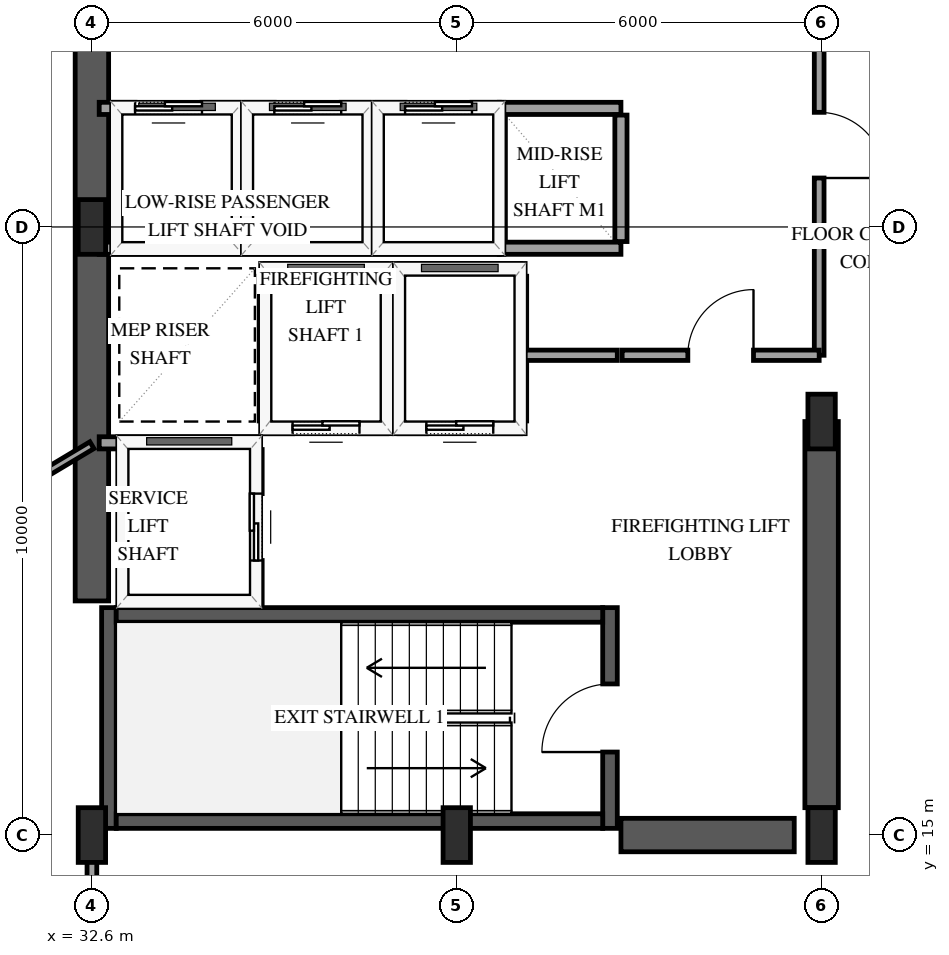
"""IFC4 building model, lengths in metres.
Left out: names, types, materials, properties, quantities, classifications, styles, units other than length and angle.
Written with IfcOpenShell. Run it as: python <this file> out.ifc"""

import sys

from ifc_helpers import new_model, si_unit, direction, frame, frame_2d, origin, origin_2d, place, context, subcontext, project, spatial, rectangle, extrude, element, fill, save


model = new_model("IFC4")
c1 = context("Model", 3, precision=1e-05, world=origin(), true_north=direction((0.0, 1.0)))
c2 = subcontext(c1, "Body", "Model", "MODEL_VIEW")
j1 = project(units=[si_unit("LENGTHUNIT", "METRE"), si_unit("PLANEANGLEUNIT", "RADIAN")], contexts=[c1])
p1 = place(None, origin())
s1 = spatial("IfcSite", under=j1, at=p1, CompositionType="ELEMENT")
p2 = place(p1, origin())
s2 = spatial("IfcBuilding", under=s1, at=p2, CompositionType="ELEMENT")
p3 = place(p2, frame((0.0, 0.0, 114.7)))
s3 = spatial("IfcBuildingStorey", under=s2, at=p3, CompositionType="ELEMENT", Elevation=114.7)
p4 = place(p3, frame((32.88, 15.11, 0.0), z_axis=(0.0, 0.0, 1.0), x_axis=(0.0, 1.0, 0.0)))
e1 = element("IfcWall", 1, at=p4, inside=s3, PredefinedType="SHEAR", context=c2, shape_type="SweptSolid", body=[
    extrude(rectangle(XDim=3.63, YDim=0.24, at=frame_2d((1.815, 0.0))), origin(), (0.0, 0.0, 1.0), 3.9),
])
p5 = place(p3, frame((41.12, 15.11, 0.0), z_axis=(0.0, 0.0, 1.0), x_axis=(0.0, 1.0, 0.0)))
e2 = element("IfcWall", 2, at=p5, inside=s3, PredefinedType="SHEAR", context=c2, shape_type="SweptSolid", body=[
    extrude(rectangle(XDim=3.63, YDim=0.24, at=frame_2d((1.815, 0.0))), origin(), (0.0, 0.0, 1.0), 3.9),
])
p6 = place(p5, frame((1.255, 0.0, 0.0)))
e3 = element("IfcOpeningElement", 3, at=p6, cuts=e2, PredefinedType="OPENING", context=c2, shape_type="SweptSolid", body=[
    extrude(rectangle(XDim=1.12, YDim=2.15, at=frame_2d((0.56, 1.075))), frame((0.0, 0.13, 0.0), z_axis=(0.0, -1.0, 0.0), x_axis=(1.0, 0.0, 0.0)), (0.0, 0.0, 1.0), 0.26),
])
for number, where, z_axis, x_axis in (
    (4, (33.0, 15.23, 0.0), (0.0, 0.0, 1.0), (1.0, 0.0, 0.0)),
    (5, (33.0, 18.62, 0.0), (0.0, 0.0, 1.0), (1.0, 0.0, 0.0)),
):
    element("IfcWall", number, at=place(p3, frame(where, z_axis=z_axis, x_axis=x_axis)), inside=s3, PredefinedType="SHEAR", context=c2, shape_type="SweptSolid", body=[
        extrude(rectangle(XDim=8.0, YDim=0.24, at=frame_2d((4.0, 0.0))), origin(), (0.0, 0.0, 1.0), 3.9),
    ])
p7 = place(p3, frame((32.6, 18.85, 0.0), z_axis=(0.0, 0.0, 1.0), x_axis=(0.0, 1.0, 0.0)))
e6 = element("IfcWall", 6, at=p7, inside=s3, PredefinedType="SHEAR", context=c2, shape_type="SweptSolid", body=[
    extrude(rectangle(XDim=12.3, YDim=0.55, at=frame_2d((6.15, 0.0))), origin(), (0.0, 0.0, 1.0), 3.9),
])
p8 = place(p3, frame((41.3, 15.0, 0.0), z_axis=(0.0, 0.0, 1.0), x_axis=(1.0, 0.0, 0.0)))
e7 = element("IfcWall", 7, at=p8, inside=s3, PredefinedType="SHEAR", context=c2, shape_type="SweptSolid", body=[
    extrude(rectangle(XDim=2.85, YDim=0.55, at=frame_2d((1.425, 0.0))), origin(), (0.0, 0.0, 1.0), 3.9),
])
p9 = place(p3, frame((44.6, 15.45, 0.0), z_axis=(0.0, 0.0, 1.0), x_axis=(0.0, 1.0, 0.0)))
e8 = element("IfcWall", 8, at=p9, inside=s3, PredefinedType="SHEAR", context=c2, shape_type="SweptSolid", body=[
    extrude(rectangle(XDim=6.35, YDim=0.55, at=frame_2d((3.175, 0.0))), origin(), (0.0, 0.0, 1.0), 3.9),
])
for number, where, z_axis, x_axis in (
    (9, (32.6, 15.0, 0.0), (0.0, 0.0, 1.0), (1.0, 0.0, 0.0)),
    (10, (32.6, 25.0, 0.0), (0.0, 0.0, 1.0), (1.0, 0.0, 0.0)),
    (11, (38.6, 15.0, 0.0), (0.0, 0.0, 1.0), (1.0, 0.0, 0.0)),
    (12, (44.6, 15.0, 0.0), (0.0, 0.0, 1.0), (1.0, 0.0, 0.0)),
    (13, (44.6, 21.8, 0.0), (0.0, 0.0, 1.0), (1.0, 0.0, 0.0)),
):
    element("IfcColumn", number, at=place(p3, frame(where, z_axis=z_axis, x_axis=x_axis)), inside=s3, PredefinedType="PILASTER", context=c2, shape_type="SweptSolid", body=[
        extrude(rectangle(XDim=0.45, YDim=0.9, at=origin_2d()), origin(), (0.0, 0.0, 1.0), 3.9),
    ])
p10 = place(p3, frame((35.45, 21.7, 0.0), z_axis=(0.0, 0.0, 1.0), x_axis=(1.0, 0.0, 0.0)))
e14 = element("IfcWall", 14, at=p10, inside=s3, PredefinedType="SOLIDWALL", context=c2, shape_type="SweptSolid", body=[
    extrude(rectangle(XDim=2.0, YDim=0.2, at=frame_2d((1.0, 0.0))), origin(), (0.0, 0.0, 1.0), 3.6),
])
p11 = place(p10, frame((0.45, 0.0, 0.0)))
e15 = element("IfcOpeningElement", 15, at=p11, cuts=e14, PredefinedType="OPENING", context=c2, shape_type="SweptSolid", body=[
    extrude(rectangle(XDim=1.1, YDim=2.15, at=frame_2d((0.55, 1.075))), frame((0.0, 0.11, 0.0), z_axis=(0.0, -1.0, 0.0), x_axis=(1.0, 0.0, 0.0)), (0.0, 0.0, 1.0), 0.22),
])
p12 = place(p3, frame((35.45, 24.3, 0.0), z_axis=(0.0, 0.0, 1.0), x_axis=(1.0, 0.0, 0.0)))
e16 = element("IfcWall", 16, at=p12, inside=s3, PredefinedType="SOLIDWALL", context=c2, shape_type="SweptSolid", body=[
    extrude(rectangle(XDim=2.0, YDim=0.2, at=frame_2d((1.0, 0.0))), origin(), (0.0, 0.0, 1.0), 3.6),
])
for number, where, z_axis, x_axis in (
    (17, (35.45, 21.81, 0.0), (0.0, 0.0, 1.0), (0.0, 1.0, 0.0)),
    (18, (37.45, 21.81, 0.0), (0.0, 0.0, 1.0), (0.0, 1.0, 0.0)),
):
    element("IfcWall", number, at=place(p3, frame(where, z_axis=z_axis, x_axis=x_axis)), inside=s3, PredefinedType="SOLIDWALL", context=c2, shape_type="SweptSolid", body=[
        extrude(rectangle(XDim=2.38, YDim=0.2, at=frame_2d((1.19, 0.0))), origin(), (0.0, 0.0, 1.0), 3.6),
    ])
p13 = place(p3, frame((37.65, 21.7, 0.0), z_axis=(0.0, 0.0, 1.0), x_axis=(1.0, 0.0, 0.0)))
e19 = element("IfcWall", 19, at=p13, inside=s3, PredefinedType="SOLIDWALL", context=c2, shape_type="SweptSolid", body=[
    extrude(rectangle(XDim=2.0, YDim=0.2, at=frame_2d((1.0, 0.0))), origin(), (0.0, 0.0, 1.0), 3.6),
])
p14 = place(p13, frame((0.45, 0.0, 0.0)))
e20 = element("IfcOpeningElement", 20, at=p14, cuts=e19, PredefinedType="OPENING", context=c2, shape_type="SweptSolid", body=[
    extrude(rectangle(XDim=1.1, YDim=2.15, at=frame_2d((0.55, 1.075))), frame((0.0, 0.11, 0.0), z_axis=(0.0, -1.0, 0.0), x_axis=(1.0, 0.0, 0.0)), (0.0, 0.0, 1.0), 0.22),
])
p15 = place(p3, frame((37.65, 24.3, 0.0), z_axis=(0.0, 0.0, 1.0), x_axis=(1.0, 0.0, 0.0)))
e21 = element("IfcWall", 21, at=p15, inside=s3, PredefinedType="SOLIDWALL", context=c2, shape_type="SweptSolid", body=[
    extrude(rectangle(XDim=2.0, YDim=0.2, at=frame_2d((1.0, 0.0))), origin(), (0.0, 0.0, 1.0), 3.6),
])
p16 = place(p3, frame((39.65, 21.81, 0.0), z_axis=(0.0, 0.0, 1.0), x_axis=(0.0, 1.0, 0.0)))
e22 = element("IfcWall", 22, at=p16, inside=s3, PredefinedType="SOLIDWALL", context=c2, shape_type="SweptSolid", body=[
    extrude(rectangle(XDim=2.38, YDim=0.2, at=frame_2d((1.19, 0.0))), origin(), (0.0, 0.0, 1.0), 3.6),
])
p17 = place(p3, frame((32.72, 21.45, 0.0), z_axis=(0.0, 0.0, 1.0), x_axis=(1.0, 0.0, 0.0)))
e23 = element("IfcWall", 23, at=p17, inside=s3, PredefinedType="SOLIDWALL", context=c2, shape_type="SweptSolid", body=[
    extrude(rectangle(XDim=2.58, YDim=0.2, at=frame_2d((1.29, 0.0))), origin(), (0.0, 0.0, 1.0), 3.6),
])
p18 = place(p3, frame((35.3, 18.79, 0.0), z_axis=(0.0, 0.0, 1.0), x_axis=(0.0, 1.0, 0.0)))
e24 = element("IfcWall", 24, at=p18, inside=s3, PredefinedType="SOLIDWALL", context=c2, shape_type="SweptSolid", body=[
    extrude(rectangle(XDim=2.55, YDim=0.2, at=frame_2d((1.275, 0.0))), origin(), (0.0, 0.0, 1.0), 3.6),
])
p19 = place(p18, frame((0.725, 0.0, 0.0)))
e25 = element("IfcOpeningElement", 25, at=p19, cuts=e24, PredefinedType="OPENING", context=c2, shape_type="SweptSolid", body=[
    extrude(rectangle(XDim=1.1, YDim=2.15, at=frame_2d((0.55, 1.075))), frame((0.0, 0.11, 0.0), z_axis=(0.0, -1.0, 0.0), x_axis=(1.0, 0.0, 0.0)), (0.0, 0.0, 1.0), 0.22),
])
p20 = place(p3, frame((32.72, 24.65, 0.0), z_axis=(0.0, 0.0, 1.0), x_axis=(1.0, 0.0, 0.0)))
e26 = element("IfcWall", 26, at=p20, inside=s3, PredefinedType="SOLIDWALL", context=c2, shape_type="SweptSolid", body=[
    extrude(rectangle(XDim=2.28, YDim=0.2, at=frame_2d((1.14, 0.0))), origin(), (0.0, 0.0, 1.0), 3.6),
])
p21 = place(p3, frame((32.72, 26.95, 0.0), z_axis=(0.0, 0.0, 1.0), x_axis=(1.0, 0.0, 0.0)))
e27 = element("IfcWall", 27, at=p21, inside=s3, PredefinedType="SOLIDWALL", context=c2, shape_type="SweptSolid", body=[
    extrude(rectangle(XDim=2.28, YDim=0.2, at=frame_2d((1.14, 0.0))), origin(), (0.0, 0.0, 1.0), 3.6),
])
p22 = place(p21, frame((0.59, 0.0, 0.0)))
e28 = element("IfcOpeningElement", 28, at=p22, cuts=e27, PredefinedType="OPENING", context=c2, shape_type="SweptSolid", body=[
    extrude(rectangle(XDim=1.1, YDim=2.15, at=frame_2d((0.55, 1.075))), frame((0.0, 0.11, 0.0), z_axis=(0.0, -1.0, 0.0), x_axis=(1.0, 0.0, 0.0)), (0.0, 0.0, 1.0), 0.22),
])
p23 = place(p3, frame((35.0, 24.76, 0.0), z_axis=(0.0, 0.0, 1.0), x_axis=(0.0, 1.0, 0.0)))
e29 = element("IfcWall", 29, at=p23, inside=s3, PredefinedType="SOLIDWALL", context=c2, shape_type="SweptSolid", body=[
    extrude(rectangle(XDim=2.08, YDim=0.2, at=frame_2d((1.04, 0.0))), origin(), (0.0, 0.0, 1.0), 3.6),
])
p24 = place(p3, frame((35.15, 24.65, 0.0), z_axis=(0.0, 0.0, 1.0), x_axis=(1.0, 0.0, 0.0)))
e30 = element("IfcWall", 30, at=p24, inside=s3, PredefinedType="SOLIDWALL", context=c2, shape_type="SweptSolid", body=[
    extrude(rectangle(XDim=2.0, YDim=0.2, at=frame_2d((1.0, 0.0))), origin(), (0.0, 0.0, 1.0), 3.6),
])
p25 = place(p3, frame((35.15, 26.95, 0.0), z_axis=(0.0, 0.0, 1.0), x_axis=(1.0, 0.0, 0.0)))
e31 = element("IfcWall", 31, at=p25, inside=s3, PredefinedType="SOLIDWALL", context=c2, shape_type="SweptSolid", body=[
    extrude(rectangle(XDim=2.0, YDim=0.2, at=frame_2d((1.0, 0.0))), origin(), (0.0, 0.0, 1.0), 3.6),
])
p26 = place(p25, frame((0.45, 0.0, 0.0)))
e32 = element("IfcOpeningElement", 32, at=p26, cuts=e31, PredefinedType="OPENING", context=c2, shape_type="SweptSolid", body=[
    extrude(rectangle(XDim=1.1, YDim=2.15, at=frame_2d((0.55, 1.075))), frame((0.0, 0.11, 0.0), z_axis=(0.0, -1.0, 0.0), x_axis=(1.0, 0.0, 0.0)), (0.0, 0.0, 1.0), 0.22),
])
p27 = place(p3, frame((37.15, 24.76, 0.0), z_axis=(0.0, 0.0, 1.0), x_axis=(0.0, 1.0, 0.0)))
e33 = element("IfcWall", 33, at=p27, inside=s3, PredefinedType="SOLIDWALL", context=c2, shape_type="SweptSolid", body=[
    extrude(rectangle(XDim=2.08, YDim=0.2, at=frame_2d((1.04, 0.0))), origin(), (0.0, 0.0, 1.0), 3.6),
])
p28 = place(p3, frame((37.3, 24.65, 0.0), z_axis=(0.0, 0.0, 1.0), x_axis=(1.0, 0.0, 0.0)))
e34 = element("IfcWall", 34, at=p28, inside=s3, PredefinedType="SOLIDWALL", context=c2, shape_type="SweptSolid", body=[
    extrude(rectangle(XDim=2.0, YDim=0.2, at=frame_2d((1.0, 0.0))), origin(), (0.0, 0.0, 1.0), 3.6),
])
p29 = place(p3, frame((37.3, 26.95, 0.0), z_axis=(0.0, 0.0, 1.0), x_axis=(1.0, 0.0, 0.0)))
e35 = element("IfcWall", 35, at=p29, inside=s3, PredefinedType="SOLIDWALL", context=c2, shape_type="SweptSolid", body=[
    extrude(rectangle(XDim=2.0, YDim=0.2, at=frame_2d((1.0, 0.0))), origin(), (0.0, 0.0, 1.0), 3.6),
])
p30 = place(p29, frame((0.45, 0.0, 0.0)))
e36 = element("IfcOpeningElement", 36, at=p30, cuts=e35, PredefinedType="OPENING", context=c2, shape_type="SweptSolid", body=[
    extrude(rectangle(XDim=1.1, YDim=2.15, at=frame_2d((0.55, 1.075))), frame((0.0, 0.11, 0.0), z_axis=(0.0, -1.0, 0.0), x_axis=(1.0, 0.0, 0.0)), (0.0, 0.0, 1.0), 0.22),
])
p31 = place(p3, frame((39.3, 24.76, 0.0), z_axis=(0.0, 0.0, 1.0), x_axis=(0.0, 1.0, 0.0)))
e37 = element("IfcWall", 37, at=p31, inside=s3, PredefinedType="SOLIDWALL", context=c2, shape_type="SweptSolid", body=[
    extrude(rectangle(XDim=2.08, YDim=0.2, at=frame_2d((1.04, 0.0))), origin(), (0.0, 0.0, 1.0), 3.6),
])
for number, where, z_axis, x_axis in (
    (38, (39.3, 24.65, 0.0), (0.0, 0.0, 1.0), (1.0, 0.0, 0.0)),
    (39, (39.3, 26.95, 0.0), (0.0, 0.0, 1.0), (1.0, 0.0, 0.0)),
):
    element("IfcWall", number, at=place(p3, frame(where, z_axis=z_axis, x_axis=x_axis)), inside=s3, PredefinedType="SOLIDWALL", context=c2, shape_type="SweptSolid", body=[
        extrude(rectangle(XDim=2.0, YDim=0.2, at=frame_2d((1.0, 0.0))), origin(), (0.0, 0.0, 1.0), 3.6),
    ])
p32 = place(p3, frame((41.3, 24.76, 0.0), z_axis=(0.0, 0.0, 1.0), x_axis=(0.0, 1.0, 0.0)))
e40 = element("IfcWall", 40, at=p32, inside=s3, PredefinedType="SOLIDWALL", context=c2, shape_type="SweptSolid", body=[
    extrude(rectangle(XDim=2.08, YDim=0.2, at=frame_2d((1.04, 0.0))), origin(), (0.0, 0.0, 1.0), 3.6),
])
p33 = place(p3, frame((44.56, 29.8, 0.0), z_axis=(0.0, 0.0, 1.0), x_axis=(0.0, -1.0, 0.0)))
e41 = element("IfcWall", 41, at=p33, inside=s3, PredefinedType="PARTITIONING", context=c2, shape_type="SweptSolid", body=[
    extrude(rectangle(XDim=6.91, YDim=0.16, at=frame_2d((3.455, 0.0))), origin(), (0.0, 0.0, 1.0), 2.64),
])
p34 = place(p33, frame((2.915, 0.0, 0.0)))
e42 = element("IfcOpeningElement", 42, at=p34, cuts=e41, PredefinedType="OPENING", context=c2, shape_type="SweptSolid", body=[
    extrude(rectangle(XDim=1.08, YDim=2.15, at=frame_2d((0.54, 1.075))), frame((0.0, 0.09, 0.0), z_axis=(0.0, -1.0, 0.0), x_axis=(1.0, 0.0, 0.0)), (0.0, 0.0, 1.0), 0.18),
])
p35 = place(p3, frame((32.6, 21.411, 0.0), z_axis=(0.0, 0.0, 1.0), x_axis=(-0.858300195468, -0.513147907002, 0.0)))
e43 = element("IfcWall", 43, at=p35, inside=s3, PredefinedType="PARTITIONING", context=c2, shape_type="SweptSolid", body=[
    extrude(rectangle(XDim=5.677, YDim=0.13, at=frame_2d((2.838, 0.0))), origin(), (0.0, 0.0, 1.0), 2.978),
])
p36 = place(p3, frame((41.32, 22.89, 0.0), z_axis=(0.0, 0.0, 1.0), x_axis=(1.0, 0.0, 0.0)))
e44 = element("IfcWall", 44, at=p36, inside=s3, PredefinedType="PARTITIONING", context=c2, shape_type="SweptSolid", body=[
    extrude(rectangle(XDim=3.24, YDim=0.17, at=frame_2d((1.62, 0.0))), origin(), (0.0, 0.0, 1.0), 3.6),
])
p37 = place(p36, frame((1.08, 0.0, 0.0)))
e45 = element("IfcOpeningElement", 45, at=p37, cuts=e44, PredefinedType="OPENING", context=c2, shape_type="SweptSolid", body=[
    extrude(rectangle(XDim=1.08, YDim=2.15, at=frame_2d((0.54, 1.075))), frame((0.0, 0.095, 0.0), z_axis=(0.0, -1.0, 0.0), x_axis=(1.0, 0.0, 0.0)), (0.0, 0.0, 1.0), 0.19),
])
p38 = place(p3, frame((32.6, 12.006, 0.0), z_axis=(0.0, 0.0, 1.0), x_axis=(0.0, 1.0, 0.0)))
e46 = element("IfcWall", 46, at=p38, inside=s3, PredefinedType="PARTITIONING", context=c2, shape_type="SweptSolid", body=[
    extrude(rectangle(XDim=2.924, YDim=0.16, at=frame_2d((1.462, 0.0))), origin(), (0.0, 0.0, 1.0), 3.6),
])
p39 = place(p3, frame((39.72, 22.89, 0.0), z_axis=(0.0, 0.0, 1.0), x_axis=(1.0, 0.0, 0.0)))
e47 = element("IfcWall", 47, at=p39, inside=s3, PredefinedType="PARTITIONING", context=c2, shape_type="SweptSolid", body=[
    extrude(rectangle(XDim=1.52, YDim=0.17, at=frame_2d((0.76, 0.0))), origin(), (0.0, 0.0, 1.0), 3.6),
])
p40 = place(p11, origin())
e48 = element("IfcDoor", 48, at=p40, inside=s3, OperationType="SLIDING_TO_LEFT", PredefinedType="DOOR", context=c2, shape_type="SweptSolid", body=[
    extrude(rectangle(XDim=1.1, YDim=2.15, at=frame_2d((0.55, 1.075))), frame((0.0, 0.025, 0.0), z_axis=(0.0, -1.0, 0.0), x_axis=(1.0, 0.0, 0.0)), (0.0, 0.0, 1.0), 0.05),
])
fill(e15, e48)
p41 = place(p14, origin())
e49 = element("IfcDoor", 49, at=p41, inside=s3, OperationType="SLIDING_TO_LEFT", PredefinedType="DOOR", context=c2, shape_type="SweptSolid", body=[
    extrude(rectangle(XDim=1.1, YDim=2.15, at=frame_2d((0.55, 1.075))), frame((0.0, 0.025, 0.0), z_axis=(0.0, -1.0, 0.0), x_axis=(1.0, 0.0, 0.0)), (0.0, 0.0, 1.0), 0.05),
])
fill(e20, e49)
p42 = place(p19, origin())
e50 = element("IfcDoor", 50, at=p42, inside=s3, OperationType="SLIDING_TO_LEFT", PredefinedType="DOOR", context=c2, shape_type="SweptSolid", body=[
    extrude(rectangle(XDim=1.1, YDim=2.15, at=frame_2d((0.55, 1.075))), frame((0.0, 0.025, 0.0), z_axis=(0.0, -1.0, 0.0), x_axis=(1.0, 0.0, 0.0)), (0.0, 0.0, 1.0), 0.05),
])
fill(e25, e50)
p43 = place(p22, origin())
e51 = element("IfcDoor", 51, at=p43, inside=s3, OperationType="SLIDING_TO_LEFT", PredefinedType="DOOR", context=c2, shape_type="SweptSolid", body=[
    extrude(rectangle(XDim=1.1, YDim=2.15, at=frame_2d((0.55, 1.075))), frame((0.0, 0.025, 0.0), z_axis=(0.0, -1.0, 0.0), x_axis=(1.0, 0.0, 0.0)), (0.0, 0.0, 1.0), 0.05),
])
fill(e28, e51)
p44 = place(p26, origin())
e52 = element("IfcDoor", 52, at=p44, inside=s3, OperationType="SLIDING_TO_LEFT", PredefinedType="DOOR", context=c2, shape_type="SweptSolid", body=[
    extrude(rectangle(XDim=1.1, YDim=2.15, at=frame_2d((0.55, 1.075))), frame((0.0, 0.025, 0.0), z_axis=(0.0, -1.0, 0.0), x_axis=(1.0, 0.0, 0.0)), (0.0, 0.0, 1.0), 0.05),
])
fill(e32, e52)
p45 = place(p30, origin())
e53 = element("IfcDoor", 53, at=p45, inside=s3, OperationType="SLIDING_TO_LEFT", PredefinedType="DOOR", context=c2, shape_type="SweptSolid", body=[
    extrude(rectangle(XDim=1.1, YDim=2.15, at=frame_2d((0.55, 1.075))), frame((0.0, 0.025, 0.0), z_axis=(0.0, -1.0, 0.0), x_axis=(1.0, 0.0, 0.0)), (0.0, 0.0, 1.0), 0.05),
])
fill(e36, e53)
p46 = place(p6, origin())
e54 = element("IfcDoor", 54, at=p46, inside=s3, OperationType="SINGLE_SWING_LEFT", PredefinedType="DOOR", context=c2, shape_type="SweptSolid", body=[
    extrude(rectangle(XDim=1.12, YDim=2.15, at=frame_2d((0.56, 1.075))), frame((0.0, 0.025, 0.0), z_axis=(0.0, -1.0, 0.0), x_axis=(1.0, 0.0, 0.0)), (0.0, 0.0, 1.0), 0.05),
])
fill(e3, e54)
p47 = place(p34, origin())
e55 = element("IfcDoor", 55, at=p47, inside=s3, OperationType="SINGLE_SWING_RIGHT", PredefinedType="DOOR", context=c2, shape_type="SweptSolid", body=[
    extrude(rectangle(XDim=1.08, YDim=2.15, at=frame_2d((0.54, 1.075))), frame((0.0, 0.025, 0.0), z_axis=(0.0, -1.0, 0.0), x_axis=(1.0, 0.0, 0.0)), (0.0, 0.0, 1.0), 0.05),
])
fill(e42, e55)
p48 = place(p37, origin())
e56 = element("IfcDoor", 56, at=p48, inside=s3, OperationType="SINGLE_SWING_RIGHT", PredefinedType="DOOR", context=c2, shape_type="SweptSolid", body=[
    extrude(rectangle(XDim=1.08, YDim=2.15, at=frame_2d((0.54, 1.075))), frame((0.0, 0.025, 0.0), z_axis=(0.0, -1.0, 0.0), x_axis=(1.0, 0.0, 0.0)), (0.0, 0.0, 1.0), 0.05),
])
fill(e45, e56)
save(model, sys.argv[1])
